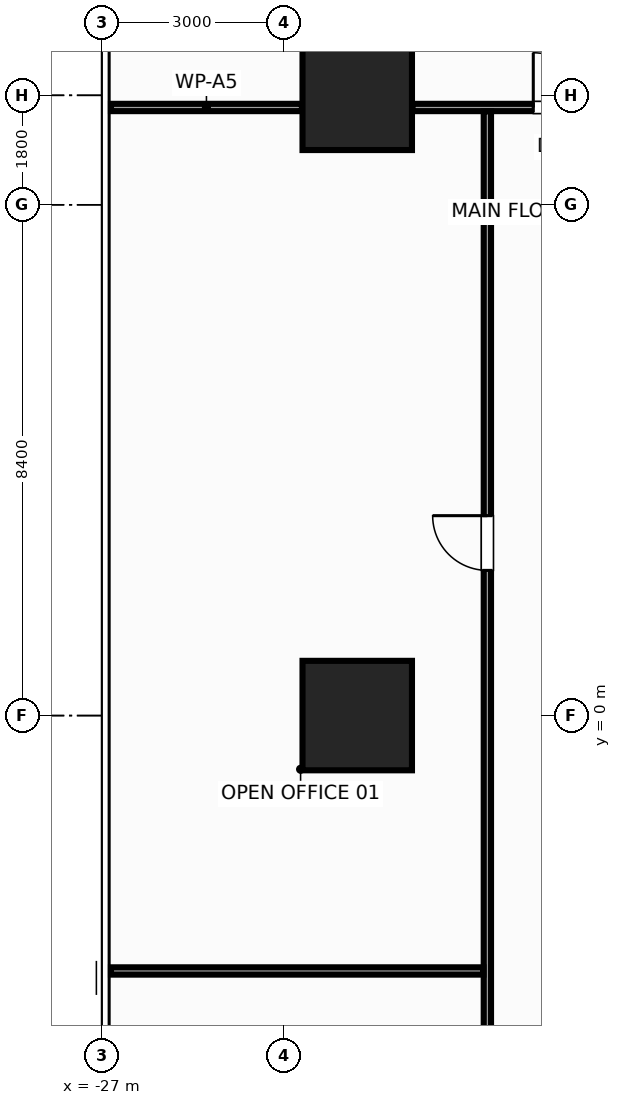
"""IFC4 building model, lengths in metres.
Left out: names, types, materials, properties, quantities, classifications, styles, units other than length and angle.
Written with IfcOpenShell. Run it as: python <this file> out.ifc"""

import sys

from ifc_helpers import new_model, si_unit, direction, frame, frame_2d, origin, origin_2d, place, context, subcontext, project, spatial, rectangle, extrude, source, transform, mapped, element, fill, save


model = new_model("IFC4")
c1 = context("Model", 3, precision=1e-05, world=origin(), true_north=direction((0.0, 1.0)))
c2 = subcontext(c1, "Body", "Model", "MODEL_VIEW")
j1 = project(units=[si_unit("LENGTHUNIT", "METRE"), si_unit("PLANEANGLEUNIT", "RADIAN")], contexts=[c1])
p1 = place(None, origin())
s1 = spatial("IfcSite", under=j1, at=p1, CompositionType="ELEMENT")
p2 = place(p1, origin())
s2 = spatial("IfcBuilding", under=s1, at=p2, CompositionType="ELEMENT")
p3 = place(p2, frame((0.0, 0.0, 30.8)))
s3 = spatial("IfcBuildingStorey", under=s2, at=p3, CompositionType="ELEMENT", Elevation=30.8)
m1 = source(origin(), c2, "Body", "SweptSolid", [
    extrude(rectangle(XDim=1.8, YDim=1.8, at=origin_2d()), origin(), (0.0, 0.0, 1.0), 3.6),
])
for number, where, z_axis, x_axis in (
    (1, (-22.8, 0.0, 0.0), (0.0, 0.0, 1.0), (1.0, 0.0, 0.0)),
    (2, (-22.8, 10.2, 0.0), (0.0, 0.0, 1.0), (1.0, 0.0, 0.0)),
):
    element("IfcColumn", number, at=place(p3, frame(where, z_axis=z_axis, x_axis=x_axis)), inside=s3, PredefinedType="COLUMN", context=c2, shape_type="MappedRepresentation", body=[
        mapped(m1, transform((0.0, 0.0, 0.0), x_axis=(1.0, 0.0, 0.0), y_axis=(0.0, 1.0, 0.0), z_axis=(0.0, 0.0, 1.0), scale=1.0)),
    ])
m2 = source(origin(), c2, "Body", "SweptSolid", [
    extrude(rectangle(XDim=3.14, YDim=0.12, at=frame_2d((1.57, 0.0))), origin(), (0.0, 0.0, 1.0), 2.435),
])
p4 = place(p3, frame((-26.85, 10.0, 0.0), z_axis=(0.0, 0.0, 1.0), x_axis=(1.0, 0.0, 0.0)))
e3 = element("IfcWall", 3, at=p4, inside=s3, PredefinedType="PARTITIONING", context=c2, shape_type="MappedRepresentation", body=[
    mapped(m2, transform((0.0, 0.0, 0.0), x_axis=(1.0, 0.0, 0.0), y_axis=(0.0, 1.0, 0.0), z_axis=(0.0, 0.0, 1.0), scale=1.0)),
])
m3 = source(origin(), c2, "Body", "SweptSolid", [
    extrude(rectangle(XDim=4.18, YDim=0.12, at=frame_2d((2.09, 0.0))), origin(), (0.0, 0.0, 1.0), 2.745),
])
p5 = place(p3, frame((-21.89, 10.0, 0.0), z_axis=(0.0, 0.0, 1.0), x_axis=(1.0, 0.0, 0.0)))
e4 = element("IfcWall", 4, at=p5, inside=s3, PredefinedType="PARTITIONING", context=c2, shape_type="MappedRepresentation", body=[
    mapped(m3, transform((0.0, 0.0, 0.0), x_axis=(1.0, 0.0, 0.0), y_axis=(0.0, 1.0, 0.0), z_axis=(0.0, 0.0, 1.0), scale=1.0)),
])
p6 = place(p5, frame((1.985, 0.0, 0.0)))
e5 = element("IfcOpeningElement", 5, at=p6, cuts=e4, PredefinedType="OPENING", context=c2, shape_type="SweptSolid", body=[
    extrude(rectangle(XDim=0.9, YDim=2.15, at=frame_2d((0.45, 1.075))), frame((0.0, 0.072, 0.0), z_axis=(0.0, -1.0, 0.0), x_axis=(1.0, 0.0, 0.0)), (0.0, 0.0, 1.0), 0.144),
])
m4 = source(origin(), c2, "Body", "SweptSolid", [
    extrude(rectangle(XDim=24.13, YDim=0.12, at=frame_2d((12.065, 0.0))), origin(), (0.0, 0.0, 1.0), 2.745),
])
p7 = place(p3, frame((-20.66, -14.195, 0.0), z_axis=(0.0, 0.0, 1.0), x_axis=(0.0, 1.0, 0.0)))
e6 = element("IfcWall", 6, at=p7, inside=s3, PredefinedType="PARTITIONING", context=c2, shape_type="MappedRepresentation", body=[
    mapped(m4, transform((0.0, 0.0, 0.0), x_axis=(1.0, 0.0, 0.0), y_axis=(0.0, 1.0, 0.0), z_axis=(0.0, 0.0, 1.0), scale=1.0)),
])
p8 = place(p7, frame((16.583, 0.0, 0.0)))
e7 = element("IfcOpeningElement", 7, at=p8, cuts=e6, PredefinedType="OPENING", context=c2, shape_type="SweptSolid", body=[
    extrude(rectangle(XDim=0.9, YDim=2.15, at=frame_2d((0.45, 1.075))), frame((0.0, 0.072, 0.0), z_axis=(0.0, -1.0, 0.0), x_axis=(1.0, 0.0, 0.0)), (0.0, 0.0, 1.0), 0.144),
])
m5 = source(origin(), c2, "Body", "SweptSolid", [
    extrude(rectangle(XDim=6.125, YDim=0.12, at=frame_2d((3.062, 0.0))), origin(), (0.0, 0.0, 1.0), 2.745),
])
p9 = place(p3, frame((-26.85, -4.2, 0.0), z_axis=(0.0, 0.0, 1.0), x_axis=(1.0, 0.0, 0.0)))
e8 = element("IfcWall", 8, at=p9, inside=s3, PredefinedType="PARTITIONING", context=c2, shape_type="MappedRepresentation", body=[
    mapped(m5, transform((0.0, 0.0, 0.0), x_axis=(1.0, 0.0, 0.0), y_axis=(0.0, 1.0, 0.0), z_axis=(0.0, 0.0, 1.0), scale=1.0)),
])
m6 = source(origin(), c2, "Body", "SweptSolid", [
    extrude(rectangle(XDim=0.9, YDim=2.15, at=frame_2d((0.45, 1.075))), frame((0.0, 0.025, 0.0), z_axis=(0.0, -1.0, 0.0), x_axis=(1.0, 0.0, 0.0)), (0.0, 0.0, 1.0), 0.05),
])
p10 = place(p6, origin())
e9 = element("IfcDoor", 9, at=p10, inside=s3, OperationType="SINGLE_SWING_LEFT", PredefinedType="DOOR", context=c2, shape_type="MappedRepresentation", body=[
    mapped(m6, transform((0.0, 0.0, 0.0), x_axis=(1.0, 0.0, 0.0), y_axis=(0.0, 1.0, 0.0), z_axis=(0.0, 0.0, 1.0), scale=1.0)),
])
fill(e5, e9)
p11 = place(p8, origin())
e10 = element("IfcDoor", 10, at=p11, inside=s3, OperationType="SINGLE_SWING_RIGHT", PredefinedType="DOOR", context=c2, shape_type="MappedRepresentation", body=[
    mapped(m6, transform((0.0, 0.0, 0.0), x_axis=(1.0, 0.0, 0.0), y_axis=(0.0, 1.0, 0.0), z_axis=(0.0, 0.0, 1.0), scale=1.0)),
])
fill(e7, e10)
save(model, sys.argv[1])
